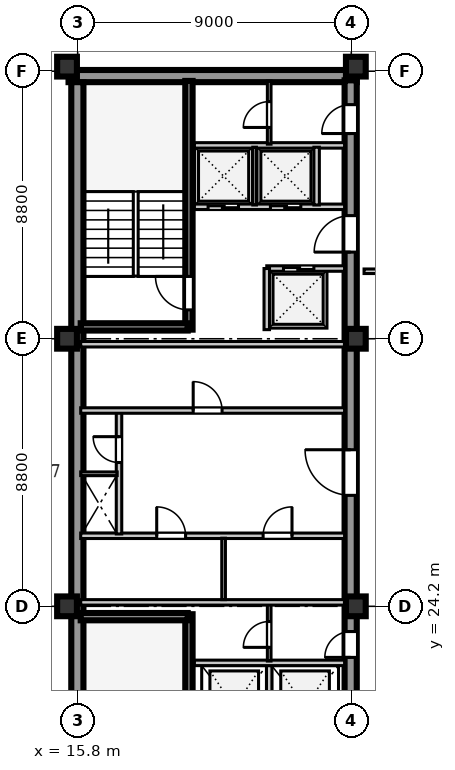
"""IFC4 building model, lengths in metres.
Left out: names, types, materials, properties, quantities, classifications, styles, units other than length and angle.
Written with IfcOpenShell. Run it as: python <this file> out.ifc"""

import sys

from ifc_helpers import new_model, si_unit, direction, frame, frame_2d, origin, origin_2d, place, context, subcontext, project, spatial, rectangle, extrude, element, fill, save


model = new_model("IFC4")
c1 = context("Model", 3, precision=1e-05, world=origin(), true_north=direction((0.0, 1.0)))
c2 = subcontext(c1, "Body", "Model", "MODEL_VIEW")
j1 = project(units=[si_unit("LENGTHUNIT", "METRE"), si_unit("PLANEANGLEUNIT", "RADIAN")], contexts=[c1])
p1 = place(None, origin())
s1 = spatial("IfcSite", under=j1, at=p1, CompositionType="ELEMENT")
p2 = place(p1, origin())
s2 = spatial("IfcBuilding", under=s1, at=p2, CompositionType="ELEMENT")
p3 = place(p2, frame((0.0, 0.0, 320.1)))
s3 = spatial("IfcBuildingStorey", under=s2, at=p3, CompositionType="ELEMENT", Elevation=320.1)
p4 = place(p3, frame((15.5, 41.64, 0.0), z_axis=(0.0, 0.0, 1.0), x_axis=(1.0, 0.0, 0.0)))
e1 = element("IfcWall", 1, at=p4, inside=s3, PredefinedType="SHEAR", context=c2, shape_type="SweptSolid", body=[
    extrude(rectangle(XDim=9.48, YDim=0.4, at=frame_2d((4.74, 0.0))), origin(), (0.0, 0.0, 1.0), 3.56),
])
p5 = place(p3, frame((15.79, 15.81, 0.0), z_axis=(0.0, 0.0, 1.0), x_axis=(0.0, 1.0, 0.0)))
e2 = element("IfcWall", 2, at=p5, inside=s3, PredefinedType="SHEAR", context=c2, shape_type="SweptSolid", body=[
    extrude(rectangle(XDim=25.63, YDim=0.4, at=frame_2d((12.815, 0.0))), origin(), (0.0, 0.0, 1.0), 3.56),
])
p6 = place(p3, frame((24.78, 15.74, 0.0), z_axis=(0.0, 0.0, 1.0), x_axis=(0.0, 1.0, 0.0)))
e3 = element("IfcWall", 3, at=p6, inside=s3, PredefinedType="SHEAR", context=c2, shape_type="SweptSolid", body=[
    extrude(rectangle(XDim=25.76, YDim=0.4, at=frame_2d((12.88, 0.0))), origin(), (0.0, 0.0, 1.0), 3.56),
])
p7 = place(p6, frame((1.61, 0.0, 0.0)))
e4 = element("IfcOpeningElement", 4, at=p7, cuts=e3, PredefinedType="OPENING", context=c2, shape_type="SweptSolid", body=[
    extrude(rectangle(XDim=1.2, YDim=2.1, at=frame_2d((0.6, 1.05))), frame((0.0, 0.21, 0.0), z_axis=(0.0, -1.0, 0.0), x_axis=(1.0, 0.0, 0.0)), (0.0, 0.0, 1.0), 0.42),
])
p8 = place(p6, frame((6.78, 0.0, 0.0)))
e5 = element("IfcOpeningElement", 5, at=p8, cuts=e3, PredefinedType="OPENING", context=c2, shape_type="SweptSolid", body=[
    extrude(rectangle(XDim=0.85, YDim=2.06, at=frame_2d((0.425, 1.03))), frame((0.0, 0.21, 0.0), z_axis=(0.0, -1.0, 0.0), x_axis=(1.0, 0.0, 0.0)), (0.0, 0.0, 1.0), 0.42),
])
p9 = place(p6, frame((12.11, 0.0, 0.0)))
e6 = element("IfcOpeningElement", 6, at=p9, cuts=e3, PredefinedType="OPENING", context=c2, shape_type="SweptSolid", body=[
    extrude(rectangle(XDim=1.5, YDim=2.12, at=frame_2d((0.75, 1.06))), frame((0.0, 0.21, 0.0), z_axis=(0.0, -1.0, 0.0), x_axis=(1.0, 0.0, 0.0)), (0.0, 0.0, 1.0), 0.42),
])
p10 = place(p6, frame((20.11, 0.0, 0.0)))
e7 = element("IfcOpeningElement", 7, at=p10, cuts=e3, PredefinedType="OPENING", context=c2, shape_type="SweptSolid", body=[
    extrude(rectangle(XDim=1.2, YDim=2.12, at=frame_2d((0.6, 1.06))), frame((0.0, 0.21, 0.0), z_axis=(0.0, -1.0, 0.0), x_axis=(1.0, 0.0, 0.0)), (0.0, 0.0, 1.0), 0.42),
])
p11 = place(p6, frame((24.01, 0.0, 0.0)))
e8 = element("IfcOpeningElement", 8, at=p11, cuts=e3, PredefinedType="OPENING", context=c2, shape_type="SweptSolid", body=[
    extrude(rectangle(XDim=0.95, YDim=2.1, at=frame_2d((0.475, 1.05))), frame((0.0, 0.21, 0.0), z_axis=(0.0, -1.0, 0.0), x_axis=(1.0, 0.0, 0.0)), (0.0, 0.0, 1.0), 0.42),
])
for number, where, z_axis, x_axis in (
    (9, (15.45, 24.2, 0.0), (0.0, 0.0, 1.0), (1.0, 0.0, 0.0)),
    (10, (15.45, 33.0, 0.0), (0.0, 0.0, 1.0), (1.0, 0.0, 0.0)),
    (11, (15.45, 41.95, 0.0), (0.0, 0.0, 1.0), (1.0, 0.0, 0.0)),
    (12, (24.95, 24.2, 0.0), (0.0, 0.0, 1.0), (1.0, 0.0, 0.0)),
    (13, (24.95, 33.0, 0.0), (0.0, 0.0, 1.0), (1.0, 0.0, 0.0)),
    (14, (24.95, 41.95, 0.0), (0.0, 0.0, 1.0), (1.0, 0.0, 0.0)),
):
    element("IfcColumn", number, at=place(p3, frame(where, z_axis=z_axis, x_axis=x_axis)), inside=s3, PredefinedType="COLUMN", context=c2, shape_type="SweptSolid", body=[
        extrude(rectangle(XDim=0.65, YDim=0.65, at=origin_2d()), origin(), (0.0, 0.0, 1.0), 3.56),
    ])
p12 = place(p3, frame((19.46, 15.74, 0.0), z_axis=(0.0, 0.0, 1.0), x_axis=(0.0, 1.0, 0.0)))
e15 = element("IfcWall", 15, at=p12, inside=s3, PredefinedType="SHEAR", context=c2, shape_type="SweptSolid", body=[
    extrude(rectangle(XDim=8.2, YDim=0.24, at=frame_2d((4.1, 0.0))), origin(), (0.0, 0.0, 1.0), 3.8),
])
p13 = place(p12, frame((0.45, 0.0, 0.0)))
e16 = element("IfcOpeningElement", 16, at=p13, cuts=e15, PredefinedType="OPENING", context=c2, shape_type="SweptSolid", body=[
    extrude(rectangle(XDim=1.1, YDim=2.1, at=frame_2d((0.55, 1.05))), frame((0.0, 0.13, 0.0), z_axis=(0.0, -1.0, 0.0), x_axis=(1.0, 0.0, 0.0)), (0.0, 0.0, 1.0), 0.26),
])
p14 = place(p3, frame((15.9, 23.86, 0.0), z_axis=(0.0, 0.0, 1.0), x_axis=(1.0, 0.0, 0.0)))
e17 = element("IfcWall", 17, at=p14, inside=s3, PredefinedType="SHEAR", context=c2, shape_type="SweptSolid", body=[
    extrude(rectangle(XDim=3.52, YDim=0.24, at=frame_2d((1.76, 0.0))), origin(), (0.0, 0.0, 1.0), 3.8),
])
p15 = place(p3, frame((22.1, 19.51, 0.0), z_axis=(0.0, 0.0, 1.0), x_axis=(0.0, 1.0, 0.0)))
e18 = element("IfcWall", 18, at=p15, inside=s3, PredefinedType="SOLIDWALL", context=c2, shape_type="SweptSolid", body=[
    extrude(rectangle(XDim=2.74, YDim=0.18, at=frame_2d((1.37, 0.0))), origin(), (0.0, 0.0, 1.0), 3.56),
])
p16 = place(p3, frame((19.64, 22.34, 0.0), z_axis=(0.0, 0.0, 1.0), x_axis=(1.0, 0.0, 0.0)))
e19 = element("IfcWall", 19, at=p16, inside=s3, PredefinedType="SOLIDWALL", context=c2, shape_type="SweptSolid", body=[
    extrude(rectangle(XDim=4.94, YDim=0.18, at=frame_2d((2.47, 0.0))), origin(), (0.0, 0.0, 1.0), 3.56),
])
p17 = place(p3, frame((22.1, 22.4, 0.0), z_axis=(0.0, 0.0, 1.0), x_axis=(0.0, 1.0, 0.0)))
e20 = element("IfcWall", 20, at=p17, inside=s3, PredefinedType="PARTITIONING", context=c2, shape_type="SweptSolid", body=[
    extrude(rectangle(XDim=1.88, YDim=0.12, at=frame_2d((0.94, 0.0))), origin(), (0.0, 0.0, 1.0), 3.56),
])
p18 = place(p17, frame((0.45, 0.0, 0.0)))
e21 = element("IfcOpeningElement", 21, at=p18, cuts=e20, PredefinedType="OPENING", context=c2, shape_type="SweptSolid", body=[
    extrude(rectangle(XDim=0.85, YDim=2.06, at=frame_2d((0.425, 1.03))), frame((0.0, 0.07, 0.0), z_axis=(0.0, -1.0, 0.0), x_axis=(1.0, 0.0, 0.0)), (0.0, 0.0, 1.0), 0.14),
])
p19 = place(p3, frame((15.9, 26.52, 0.0), z_axis=(0.0, 0.0, 1.0), x_axis=(1.0, 0.0, 0.0)))
e22 = element("IfcWall", 22, at=p19, inside=s3, PredefinedType="SOLIDWALL", context=c2, shape_type="SweptSolid", body=[
    extrude(rectangle(XDim=8.68, YDim=0.18, at=frame_2d((4.34, 0.0))), origin(), (0.0, 0.0, 1.0), 3.56),
])
p20 = place(p19, frame((2.5, 0.0, 0.0)))
e23 = element("IfcOpeningElement", 23, at=p20, cuts=e22, PredefinedType="OPENING", context=c2, shape_type="SweptSolid", body=[
    extrude(rectangle(XDim=0.95, YDim=2.1, at=frame_2d((0.475, 1.05))), frame((0.0, 0.1, 0.0), z_axis=(0.0, -1.0, 0.0), x_axis=(1.0, 0.0, 0.0)), (0.0, 0.0, 1.0), 0.2),
])
p21 = place(p19, frame((6.0, 0.0, 0.0)))
e24 = element("IfcOpeningElement", 24, at=p21, cuts=e22, PredefinedType="OPENING", context=c2, shape_type="SweptSolid", body=[
    extrude(rectangle(XDim=0.95, YDim=2.1, at=frame_2d((0.475, 1.05))), frame((0.0, 0.1, 0.0), z_axis=(0.0, -1.0, 0.0), x_axis=(1.0, 0.0, 0.0)), (0.0, 0.0, 1.0), 0.2),
])
p22 = place(p3, frame((15.9, 24.33, 0.0), z_axis=(0.0, 0.0, 1.0), x_axis=(1.0, 0.0, 0.0)))
e25 = element("IfcWall", 25, at=p22, inside=s3, PredefinedType="SOLIDWALL", context=c2, shape_type="SweptSolid", body=[
    extrude(rectangle(XDim=8.68, YDim=0.18, at=frame_2d((4.34, 0.0))), origin(), (0.0, 0.0, 1.0), 2.96),
])
p23 = place(p3, frame((20.6, 24.42, 0.0), z_axis=(0.0, 0.0, 1.0), x_axis=(0.0, 1.0, 0.0)))
e26 = element("IfcWall", 26, at=p23, inside=s3, PredefinedType="PARTITIONING", context=c2, shape_type="SweptSolid", body=[
    extrude(rectangle(XDim=2.02, YDim=0.12, at=frame_2d((1.01, 0.0))), origin(), (0.0, 0.0, 1.0), 3.56),
])
p24 = place(p3, frame((17.16, 26.58, 0.0), z_axis=(0.0, 0.0, 1.0), x_axis=(0.0, 1.0, 0.0)))
e27 = element("IfcWall", 27, at=p24, inside=s3, PredefinedType="SOLIDWALL", context=c2, shape_type="SweptSolid", body=[
    extrude(rectangle(XDim=4.02, YDim=0.18, at=frame_2d((2.01, 0.0))), origin(), (0.0, 0.0, 1.0), 3.56),
])
p25 = place(p24, frame((2.35, 0.0, 0.0)))
e28 = element("IfcOpeningElement", 28, at=p25, cuts=e27, PredefinedType="OPENING", context=c2, shape_type="SweptSolid", body=[
    extrude(rectangle(XDim=0.85, YDim=2.06, at=frame_2d((0.425, 1.03))), frame((0.0, 0.1, 0.0), z_axis=(0.0, -1.0, 0.0), x_axis=(1.0, 0.0, 0.0)), (0.0, 0.0, 1.0), 0.2),
])
p26 = place(p3, frame((15.9, 28.56, 0.0), z_axis=(0.0, 0.0, 1.0), x_axis=(1.0, 0.0, 0.0)))
e29 = element("IfcWall", 29, at=p26, inside=s3, PredefinedType="PARTITIONING", context=c2, shape_type="SweptSolid", body=[
    extrude(rectangle(XDim=1.2, YDim=0.12, at=frame_2d((0.6, 0.0))), origin(), (0.0, 0.0, 1.0), 3.56),
])
p27 = place(p3, frame((15.9, 30.64, 0.0), z_axis=(0.0, 0.0, 1.0), x_axis=(1.0, 0.0, 0.0)))
e30 = element("IfcWall", 30, at=p27, inside=s3, PredefinedType="SOLIDWALL", context=c2, shape_type="SweptSolid", body=[
    extrude(rectangle(XDim=8.68, YDim=0.18, at=frame_2d((4.34, 0.0))), origin(), (0.0, 0.0, 1.0), 3.56),
])
p28 = place(p27, frame((3.7, 0.0, 0.0)))
e31 = element("IfcOpeningElement", 31, at=p28, cuts=e30, PredefinedType="OPENING", context=c2, shape_type="SweptSolid", body=[
    extrude(rectangle(XDim=0.95, YDim=2.1, at=frame_2d((0.475, 1.05))), frame((0.0, 0.1, 0.0), z_axis=(0.0, -1.0, 0.0), x_axis=(1.0, 0.0, 0.0)), (0.0, 0.0, 1.0), 0.2),
])
p29 = place(p3, frame((15.9, 32.82, 0.0), z_axis=(0.0, 0.0, 1.0), x_axis=(1.0, 0.0, 0.0)))
e32 = element("IfcWall", 32, at=p29, inside=s3, PredefinedType="SOLIDWALL", context=c2, shape_type="SweptSolid", body=[
    extrude(rectangle(XDim=8.68, YDim=0.18, at=frame_2d((4.34, 0.0))), origin(), (0.0, 0.0, 1.0), 2.96),
])
p30 = place(p3, frame((19.46, 33.3, 0.0), z_axis=(0.0, 0.0, 1.0), x_axis=(0.0, 1.0, 0.0)))
e33 = element("IfcWall", 33, at=p30, inside=s3, PredefinedType="SHEAR", context=c2, shape_type="SweptSolid", body=[
    extrude(rectangle(XDim=8.18, YDim=0.24, at=frame_2d((4.09, 0.0))), origin(), (0.0, 0.0, 1.0), 3.8),
])
p31 = place(p30, frame((0.65, 0.0, 0.0)))
e34 = element("IfcOpeningElement", 34, at=p31, cuts=e33, PredefinedType="OPENING", context=c2, shape_type="SweptSolid", body=[
    extrude(rectangle(XDim=1.1, YDim=2.1, at=frame_2d((0.55, 1.05))), frame((0.0, 0.13, 0.0), z_axis=(0.0, -1.0, 0.0), x_axis=(1.0, 0.0, 0.0)), (0.0, 0.0, 1.0), 0.26),
])
p32 = place(p3, frame((15.9, 33.39, 0.0), z_axis=(0.0, 0.0, 1.0), x_axis=(1.0, 0.0, 0.0)))
e35 = element("IfcWall", 35, at=p32, inside=s3, PredefinedType="SHEAR", context=c2, shape_type="SweptSolid", body=[
    extrude(rectangle(XDim=3.52, YDim=0.24, at=frame_2d((1.76, 0.0))), origin(), (0.0, 0.0, 1.0), 3.8),
])
p33 = place(p3, frame((22.02, 35.31, 0.0), z_axis=(0.0, 0.0, 1.0), x_axis=(1.0, 0.0, 0.0)))
e36 = element("IfcWall", 36, at=p33, inside=s3, PredefinedType="SOLIDWALL", context=c2, shape_type="SweptSolid", body=[
    extrude(rectangle(XDim=2.56, YDim=0.18, at=frame_2d((1.28, 0.0))), origin(), (0.0, 0.0, 1.0), 3.56),
])
p34 = place(p33, frame((0.55, 0.0, 0.0)))
e37 = element("IfcOpeningElement", 37, at=p34, cuts=e36, PredefinedType="OPENING", context=c2, shape_type="SweptSolid", body=[
    extrude(rectangle(XDim=1.0, YDim=2.1, at=frame_2d((0.5, 1.05))), frame((0.0, 0.1, 0.0), z_axis=(0.0, -1.0, 0.0), x_axis=(1.0, 0.0, 0.0)), (0.0, 0.0, 1.0), 0.2),
])
p35 = place(p3, frame((22.02, 33.3, 0.0), z_axis=(0.0, 0.0, 1.0), x_axis=(0.0, 1.0, 0.0)))
e38 = element("IfcWall", 38, at=p35, inside=s3, PredefinedType="SOLIDWALL", context=c2, shape_type="SweptSolid", body=[
    extrude(rectangle(XDim=2.01, YDim=0.18, at=frame_2d((1.005, 0.0))), origin(), (0.0, 0.0, 1.0), 3.56),
])
p36 = place(p3, frame((19.64, 37.34, 0.0), z_axis=(0.0, 0.0, 1.0), x_axis=(1.0, 0.0, 0.0)))
e39 = element("IfcWall", 39, at=p36, inside=s3, PredefinedType="SOLIDWALL", context=c2, shape_type="SweptSolid", body=[
    extrude(rectangle(XDim=4.94, YDim=0.18, at=frame_2d((2.47, 0.0))), origin(), (0.0, 0.0, 1.0), 3.56),
])
p37 = place(p36, frame((0.45, 0.0, 0.0)))
e40 = element("IfcOpeningElement", 40, at=p37, cuts=e39, PredefinedType="OPENING", context=c2, shape_type="SweptSolid", body=[
    extrude(rectangle(XDim=1.0, YDim=2.1, at=frame_2d((0.5, 1.05))), frame((0.0, 0.1, 0.0), z_axis=(0.0, -1.0, 0.0), x_axis=(1.0, 0.0, 0.0)), (0.0, 0.0, 1.0), 0.2),
])
p38 = place(p36, frame((2.5, 0.0, 0.0)))
e41 = element("IfcOpeningElement", 41, at=p38, cuts=e39, PredefinedType="OPENING", context=c2, shape_type="SweptSolid", body=[
    extrude(rectangle(XDim=1.0, YDim=2.1, at=frame_2d((0.5, 1.05))), frame((0.0, 0.1, 0.0), z_axis=(0.0, -1.0, 0.0), x_axis=(1.0, 0.0, 0.0)), (0.0, 0.0, 1.0), 0.2),
])
p39 = place(p3, frame((19.64, 39.36, 0.0), z_axis=(0.0, 0.0, 1.0), x_axis=(1.0, 0.0, 0.0)))
e42 = element("IfcWall", 42, at=p39, inside=s3, PredefinedType="SOLIDWALL", context=c2, shape_type="SweptSolid", body=[
    extrude(rectangle(XDim=4.94, YDim=0.18, at=frame_2d((2.47, 0.0))), origin(), (0.0, 0.0, 1.0), 3.56),
])
p40 = place(p3, frame((21.62, 37.4, 0.0), z_axis=(0.0, 0.0, 1.0), x_axis=(0.0, 1.0, 0.0)))
e43 = element("IfcWall", 43, at=p40, inside=s3, PredefinedType="PARTITIONING", context=c2, shape_type="SweptSolid", body=[
    extrude(rectangle(XDim=1.9, YDim=0.12, at=frame_2d((0.95, 0.0))), origin(), (0.0, 0.0, 1.0), 3.56),
])
p41 = place(p3, frame((23.66, 37.4, 0.0), z_axis=(0.0, 0.0, 1.0), x_axis=(0.0, 1.0, 0.0)))
e44 = element("IfcWall", 44, at=p41, inside=s3, PredefinedType="SOLIDWALL", context=c2, shape_type="SweptSolid", body=[
    extrude(rectangle(XDim=1.9, YDim=0.18, at=frame_2d((0.95, 0.0))), origin(), (0.0, 0.0, 1.0), 3.56),
])
p42 = place(p3, frame((22.1, 39.4, 0.0), z_axis=(0.0, 0.0, 1.0), x_axis=(0.0, 1.0, 0.0)))
e45 = element("IfcWall", 45, at=p42, inside=s3, PredefinedType="PARTITIONING", context=c2, shape_type="SweptSolid", body=[
    extrude(rectangle(XDim=2.08, YDim=0.12, at=frame_2d((1.04, 0.0))), origin(), (0.0, 0.0, 1.0), 3.56),
])
p43 = place(p42, frame((0.55, 0.0, 0.0)))
e46 = element("IfcOpeningElement", 46, at=p43, cuts=e45, PredefinedType="OPENING", context=c2, shape_type="SweptSolid", body=[
    extrude(rectangle(XDim=0.85, YDim=2.06, at=frame_2d((0.425, 1.03))), frame((0.0, 0.07, 0.0), z_axis=(0.0, -1.0, 0.0), x_axis=(1.0, 0.0, 0.0)), (0.0, 0.0, 1.0), 0.14),
])
p44 = place(p3, frame((25.22, 35.22, 0.0), z_axis=(0.0, 0.0, 1.0), x_axis=(1.0, 0.0, 0.0)))
e47 = element("IfcWall", 47, at=p44, inside=s3, PredefinedType="PARTITIONING", context=c2, shape_type="SweptSolid", body=[
    extrude(rectangle(XDim=9.5, YDim=0.15, at=frame_2d((4.75, 0.0))), origin(), (0.0, 0.0, 1.0), 3.56),
])
p45 = place(p44, frame((1.8, 0.0, 0.0)))
e48 = element("IfcOpeningElement", 48, at=p45, cuts=e47, PredefinedType="OPENING", context=c2, shape_type="SweptSolid", body=[
    extrude(rectangle(XDim=1.1, YDim=2.08, at=frame_2d((0.55, 1.04))), frame((0.0, 0.085, 0.0), z_axis=(0.0, -1.0, 0.0), x_axis=(1.0, 0.0, 0.0)), (0.0, 0.0, 1.0), 0.17),
])
p46 = place(p18, origin())
e49 = element("IfcDoor", 49, at=p46, inside=s3, OperationType="SINGLE_SWING_LEFT", PredefinedType="DOOR", context=c2, shape_type="SweptSolid", body=[
    extrude(rectangle(XDim=0.85, YDim=2.06, at=frame_2d((0.425, 1.03))), frame((0.0, 0.025, 0.0), z_axis=(0.0, -1.0, 0.0), x_axis=(1.0, 0.0, 0.0)), (0.0, 0.0, 1.0), 0.05),
])
fill(e21, e49)
p47 = place(p8, frame((0.85, 0.0, 0.0), z_axis=(0.0, 0.0, 1.0), x_axis=(-1.0, 0.0, 0.0)))
e50 = element("IfcDoor", 50, at=p47, inside=s3, OperationType="SINGLE_SWING_RIGHT", PredefinedType="DOOR", context=c2, shape_type="SweptSolid", body=[
    extrude(rectangle(XDim=0.85, YDim=2.06, at=frame_2d((0.425, 1.03))), frame((0.0, 0.025, 0.0), z_axis=(0.0, -1.0, 0.0), x_axis=(1.0, 0.0, 0.0)), (0.0, 0.0, 1.0), 0.05),
])
fill(e5, e50)
p48 = place(p20, origin())
e51 = element("IfcDoor", 51, at=p48, inside=s3, OperationType="SINGLE_SWING_LEFT", PredefinedType="DOOR", context=c2, shape_type="SweptSolid", body=[
    extrude(rectangle(XDim=0.95, YDim=2.1, at=frame_2d((0.475, 1.05))), frame((0.0, 0.025, 0.0), z_axis=(0.0, -1.0, 0.0), x_axis=(1.0, 0.0, 0.0)), (0.0, 0.0, 1.0), 0.05),
])
fill(e23, e51)
p49 = place(p21, origin())
e52 = element("IfcDoor", 52, at=p49, inside=s3, OperationType="SINGLE_SWING_RIGHT", PredefinedType="DOOR", context=c2, shape_type="SweptSolid", body=[
    extrude(rectangle(XDim=0.95, YDim=2.1, at=frame_2d((0.475, 1.05))), frame((0.0, 0.025, 0.0), z_axis=(0.0, -1.0, 0.0), x_axis=(1.0, 0.0, 0.0)), (0.0, 0.0, 1.0), 0.05),
])
fill(e24, e52)
p50 = place(p25, origin())
e53 = element("IfcDoor", 53, at=p50, inside=s3, OperationType="SINGLE_SWING_RIGHT", PredefinedType="DOOR", context=c2, shape_type="SweptSolid", body=[
    extrude(rectangle(XDim=0.85, YDim=2.06, at=frame_2d((0.425, 1.03))), frame((0.0, 0.025, 0.0), z_axis=(0.0, -1.0, 0.0), x_axis=(1.0, 0.0, 0.0)), (0.0, 0.0, 1.0), 0.05),
])
fill(e28, e53)
p51 = place(p9, frame((1.5, 0.0, 0.0), z_axis=(0.0, 0.0, 1.0), x_axis=(-1.0, 0.0, 0.0)))
e54 = element("IfcDoor", 54, at=p51, inside=s3, OperationType="SINGLE_SWING_LEFT", PredefinedType="DOOR", context=c2, shape_type="SweptSolid", body=[
    extrude(rectangle(XDim=1.5, YDim=2.12, at=frame_2d((0.75, 1.06))), frame((0.0, 0.025, 0.0), z_axis=(0.0, -1.0, 0.0), x_axis=(1.0, 0.0, 0.0)), (0.0, 0.0, 1.0), 0.05),
])
fill(e6, e54)
p52 = place(p28, frame((0.95, 0.0, 0.0), z_axis=(0.0, 0.0, 1.0), x_axis=(-1.0, 0.0, 0.0)))
e55 = element("IfcDoor", 55, at=p52, inside=s3, OperationType="SINGLE_SWING_RIGHT", PredefinedType="DOOR", context=c2, shape_type="SweptSolid", body=[
    extrude(rectangle(XDim=0.95, YDim=2.1, at=frame_2d((0.475, 1.05))), frame((0.0, 0.025, 0.0), z_axis=(0.0, -1.0, 0.0), x_axis=(1.0, 0.0, 0.0)), (0.0, 0.0, 1.0), 0.05),
])
fill(e31, e55)
p53 = place(p31, origin())
e56 = element("IfcDoor", 56, at=p53, inside=s3, OperationType="SINGLE_SWING_RIGHT", PredefinedType="DOOR", context=c2, shape_type="SweptSolid", body=[
    extrude(rectangle(XDim=1.1, YDim=2.1, at=frame_2d((0.55, 1.05))), frame((0.0, 0.025, 0.0), z_axis=(0.0, -1.0, 0.0), x_axis=(1.0, 0.0, 0.0)), (0.0, 0.0, 1.0), 0.05),
])
fill(e34, e56)
p54 = place(p10, frame((1.2, 0.0, 0.0), z_axis=(0.0, 0.0, 1.0), x_axis=(-1.0, 0.0, 0.0)))
e57 = element("IfcDoor", 57, at=p54, inside=s3, OperationType="SINGLE_SWING_RIGHT", PredefinedType="DOOR", context=c2, shape_type="SweptSolid", body=[
    extrude(rectangle(XDim=1.2, YDim=2.12, at=frame_2d((0.6, 1.06))), frame((0.0, 0.025, 0.0), z_axis=(0.0, -1.0, 0.0), x_axis=(1.0, 0.0, 0.0)), (0.0, 0.0, 1.0), 0.05),
])
fill(e7, e57)
p55 = place(p37, frame((1.0, 0.0, 0.0), z_axis=(0.0, 0.0, 1.0), x_axis=(-1.0, 0.0, 0.0)))
e58 = element("IfcDoor", 58, at=p55, inside=s3, OperationType="DOUBLE_DOOR_SLIDING", PredefinedType="DOOR", context=c2, shape_type="SweptSolid", body=[
    extrude(rectangle(XDim=1.0, YDim=2.1, at=frame_2d((0.5, 1.05))), frame((0.0, 0.025, 0.0), z_axis=(0.0, -1.0, 0.0), x_axis=(1.0, 0.0, 0.0)), (0.0, 0.0, 1.0), 0.05),
])
fill(e40, e58)
p56 = place(p38, frame((1.0, 0.0, 0.0), z_axis=(0.0, 0.0, 1.0), x_axis=(-1.0, 0.0, 0.0)))
e59 = element("IfcDoor", 59, at=p56, inside=s3, OperationType="DOUBLE_DOOR_SLIDING", PredefinedType="DOOR", context=c2, shape_type="SweptSolid", body=[
    extrude(rectangle(XDim=1.0, YDim=2.1, at=frame_2d((0.5, 1.05))), frame((0.0, 0.025, 0.0), z_axis=(0.0, -1.0, 0.0), x_axis=(1.0, 0.0, 0.0)), (0.0, 0.0, 1.0), 0.05),
])
fill(e41, e59)
p57 = place(p34, origin())
e60 = element("IfcDoor", 60, at=p57, inside=s3, OperationType="DOUBLE_DOOR_SLIDING", PredefinedType="DOOR", context=c2, shape_type="SweptSolid", body=[
    extrude(rectangle(XDim=1.0, YDim=2.1, at=frame_2d((0.5, 1.05))), frame((0.0, 0.025, 0.0), z_axis=(0.0, -1.0, 0.0), x_axis=(1.0, 0.0, 0.0)), (0.0, 0.0, 1.0), 0.05),
])
fill(e37, e60)
p58 = place(p43, origin())
e61 = element("IfcDoor", 61, at=p58, inside=s3, OperationType="SINGLE_SWING_LEFT", PredefinedType="DOOR", context=c2, shape_type="SweptSolid", body=[
    extrude(rectangle(XDim=0.85, YDim=2.06, at=frame_2d((0.425, 1.03))), frame((0.0, 0.025, 0.0), z_axis=(0.0, -1.0, 0.0), x_axis=(1.0, 0.0, 0.0)), (0.0, 0.0, 1.0), 0.05),
])
fill(e46, e61)
p59 = place(p11, frame((0.95, 0.0, 0.0), z_axis=(0.0, 0.0, 1.0), x_axis=(-1.0, 0.0, 0.0)))
e62 = element("IfcDoor", 62, at=p59, inside=s3, OperationType="SINGLE_SWING_RIGHT", PredefinedType="DOOR", context=c2, shape_type="SweptSolid", body=[
    extrude(rectangle(XDim=0.95, YDim=2.1, at=frame_2d((0.475, 1.05))), frame((0.0, 0.025, 0.0), z_axis=(0.0, -1.0, 0.0), x_axis=(1.0, 0.0, 0.0)), (0.0, 0.0, 1.0), 0.05),
])
fill(e8, e62)
save(model, sys.argv[1])
